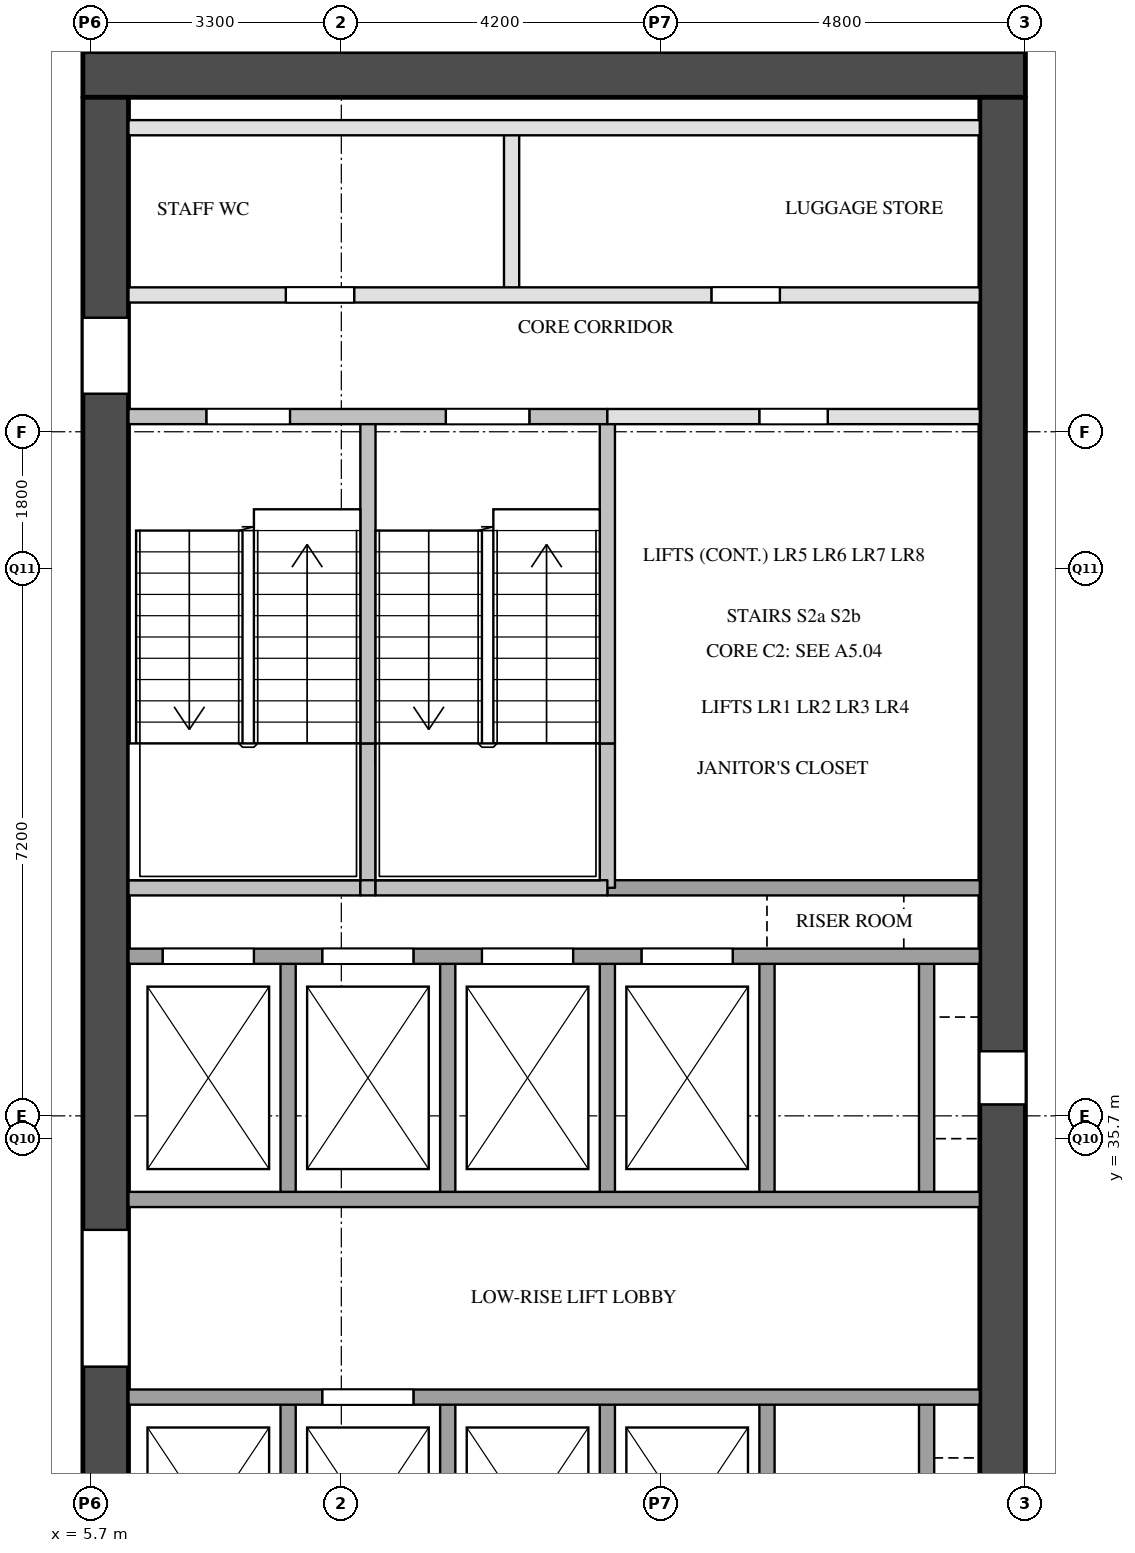
"""IFC4 building model, lengths in metres.
Left out: names, types, materials, properties, quantities, classifications, styles, units other than length and angle.
Written with IfcOpenShell. Run it as: python <this file> out.ifc"""

import sys

from ifc_helpers import new_model, si_unit, direction, frame, frame_2d, origin, place, context, subcontext, project, spatial, rectangle, extrude, element, fill, save


model = new_model("IFC4")
c1 = context("Model", 3, precision=1e-05, world=origin(), true_north=direction((0.0, 1.0)))
c2 = subcontext(c1, "Body", "Model", "MODEL_VIEW")
j1 = project(units=[si_unit("LENGTHUNIT", "METRE"), si_unit("PLANEANGLEUNIT", "RADIAN")], contexts=[c1])
p1 = place(None, origin())
s1 = spatial("IfcSite", under=j1, at=p1, CompositionType="ELEMENT")
p2 = place(p1, origin())
s2 = spatial("IfcBuilding", under=s1, at=p2, CompositionType="ELEMENT")
p3 = place(p2, frame((0.0, 0.0, 38.6)))
s3 = spatial("IfcBuildingStorey", under=s2, at=p3, CompositionType="ELEMENT", Elevation=38.6)
p4 = place(p3, frame((5.6, 49.7, 0.0), z_axis=(0.0, 0.0, 1.0), x_axis=(1.0, 0.0, 0.0)))
e1 = element("IfcWall", 1, at=p4, inside=s3, PredefinedType="SHEAR", context=c2, shape_type="SweptSolid", body=[
    extrude(rectangle(XDim=12.4, YDim=0.6, at=frame_2d((6.2, 0.0))), origin(), (0.0, 0.0, 1.0), 3.5),
])
p5 = place(p3, frame((5.9, 29.1, 0.0), z_axis=(0.0, 0.0, 1.0), x_axis=(0.0, 1.0, 0.0)))
e2 = element("IfcWall", 2, at=p5, inside=s3, PredefinedType="SHEAR", context=c2, shape_type="SweptSolid", body=[
    extrude(rectangle(XDim=20.3, YDim=0.6, at=frame_2d((10.15, 0.0))), origin(), (0.0, 0.0, 1.0), 3.5),
])
p6 = place(p5, frame((3.6, 0.0, 0.0)))
e3 = element("IfcOpeningElement", 3, at=p6, cuts=e2, PredefinedType="OPENING", context=c2, shape_type="SweptSolid", body=[
    extrude(rectangle(XDim=1.8, YDim=2.1, at=frame_2d((0.9, 1.05))), frame((0.0, 0.31, 0.0), z_axis=(0.0, -1.0, 0.0), x_axis=(1.0, 0.0, 0.0)), (0.0, 0.0, 1.0), 0.62),
])
p7 = place(p5, frame((16.4, 0.0, 0.0)))
e4 = element("IfcOpeningElement", 4, at=p7, cuts=e2, PredefinedType="OPENING", context=c2, shape_type="SweptSolid", body=[
    extrude(rectangle(XDim=1.0, YDim=2.1, at=frame_2d((0.5, 1.05))), frame((0.0, 0.31, 0.0), z_axis=(0.0, -1.0, 0.0), x_axis=(1.0, 0.0, 0.0)), (0.0, 0.0, 1.0), 0.62),
])
p8 = place(p3, frame((17.7, 29.1, 0.0), z_axis=(0.0, 0.0, 1.0), x_axis=(0.0, 1.0, 0.0)))
e5 = element("IfcWall", 5, at=p8, inside=s3, PredefinedType="SHEAR", context=c2, shape_type="SweptSolid", body=[
    extrude(rectangle(XDim=20.3, YDim=0.6, at=frame_2d((10.15, 0.0))), origin(), (0.0, 0.0, 1.0), 3.5),
])
p9 = place(p8, frame((1.25, 0.0, 0.0)))
e6 = element("IfcOpeningElement", 6, at=p9, cuts=e5, PredefinedType="OPENING", context=c2, shape_type="SweptSolid", body=[
    extrude(rectangle(XDim=0.7, YDim=2.1, at=frame_2d((0.35, 1.05))), frame((0.0, 0.31, 0.0), z_axis=(0.0, -1.0, 0.0), x_axis=(1.0, 0.0, 0.0)), (0.0, 0.0, 1.0), 0.62),
])
p10 = place(p8, frame((7.05, 0.0, 0.0)))
e7 = element("IfcOpeningElement", 7, at=p10, cuts=e5, PredefinedType="OPENING", context=c2, shape_type="SweptSolid", body=[
    extrude(rectangle(XDim=0.7, YDim=2.1, at=frame_2d((0.35, 1.05))), frame((0.0, 0.31, 0.0), z_axis=(0.0, -1.0, 0.0), x_axis=(1.0, 0.0, 0.0)), (0.0, 0.0, 1.0), 0.62),
])
p11 = place(p3, frame((8.3, 29.1, 0.0), z_axis=(0.0, 0.0, 1.0), x_axis=(0.0, 1.0, 0.0)))
e8 = element("IfcWall", 8, at=p11, inside=s3, PredefinedType="SOLIDWALL", context=c2, shape_type="SweptSolid", body=[
    extrude(rectangle(XDim=3.2, YDim=0.2, at=frame_2d((1.6, 0.0))), origin(), (0.0, 0.0, 1.0), 3.5),
])
p12 = place(p3, frame((8.3, 34.9, 0.0), z_axis=(0.0, 0.0, 1.0), x_axis=(0.0, 1.0, 0.0)))
e9 = element("IfcWall", 9, at=p12, inside=s3, PredefinedType="SOLIDWALL", context=c2, shape_type="SweptSolid", body=[
    extrude(rectangle(XDim=3.2, YDim=0.2, at=frame_2d((1.6, 0.0))), origin(), (0.0, 0.0, 1.0), 3.5),
])
p13 = place(p3, frame((9.35, 39.0, 0.0), z_axis=(0.0, 0.0, 1.0), x_axis=(0.0, 1.0, 0.0)))
e10 = element("IfcWall", 10, at=p13, inside=s3, PredefinedType="SOLIDWALL", context=c2, shape_type="SweptSolid", body=[
    extrude(rectangle(XDim=1.9, YDim=0.2, at=frame_2d((0.95, 0.0))), origin(), (0.0, 0.0, 1.0), 3.5),
])
p14 = place(p3, frame((9.35, 40.9, 0.0), z_axis=(0.0, 0.0, 1.0), x_axis=(0.0, 1.0, 0.0)))
e11 = element("IfcWall", 11, at=p14, inside=s3, PredefinedType="SOLIDWALL", context=c2, shape_type="SweptSolid", body=[
    extrude(rectangle(XDim=4.3, YDim=0.2, at=frame_2d((2.15, 0.0))), origin(), (0.0, 0.0, 1.0), 3.5),
])
p15 = place(p3, frame((10.4, 29.1, 0.0), z_axis=(0.0, 0.0, 1.0), x_axis=(0.0, 1.0, 0.0)))
e12 = element("IfcWall", 12, at=p15, inside=s3, PredefinedType="SOLIDWALL", context=c2, shape_type="SweptSolid", body=[
    extrude(rectangle(XDim=3.2, YDim=0.2, at=frame_2d((1.6, 0.0))), origin(), (0.0, 0.0, 1.0), 3.5),
])
p16 = place(p3, frame((10.4, 34.9, 0.0), z_axis=(0.0, 0.0, 1.0), x_axis=(0.0, 1.0, 0.0)))
e13 = element("IfcWall", 13, at=p16, inside=s3, PredefinedType="SOLIDWALL", context=c2, shape_type="SweptSolid", body=[
    extrude(rectangle(XDim=3.2, YDim=0.2, at=frame_2d((1.6, 0.0))), origin(), (0.0, 0.0, 1.0), 3.5),
])
p17 = place(p3, frame((11.24, 46.8, 0.0), z_axis=(0.0, 0.0, 1.0), x_axis=(0.0, 1.0, 0.0)))
e14 = element("IfcWall", 14, at=p17, inside=s3, PredefinedType="PARTITIONING", context=c2, shape_type="SweptSolid", body=[
    extrude(rectangle(XDim=2.2, YDim=0.2, at=frame_2d((1.1, 0.0))), origin(), (0.0, 0.0, 1.0), 3.5),
])
p18 = place(p3, frame((12.5, 29.1, 0.0), z_axis=(0.0, 0.0, 1.0), x_axis=(0.0, 1.0, 0.0)))
e15 = element("IfcWall", 15, at=p18, inside=s3, PredefinedType="SOLIDWALL", context=c2, shape_type="SweptSolid", body=[
    extrude(rectangle(XDim=3.2, YDim=0.2, at=frame_2d((1.6, 0.0))), origin(), (0.0, 0.0, 1.0), 3.5),
])
p19 = place(p3, frame((12.5, 34.9, 0.0), z_axis=(0.0, 0.0, 1.0), x_axis=(0.0, 1.0, 0.0)))
e16 = element("IfcWall", 16, at=p19, inside=s3, PredefinedType="SOLIDWALL", context=c2, shape_type="SweptSolid", body=[
    extrude(rectangle(XDim=3.2, YDim=0.2, at=frame_2d((1.6, 0.0))), origin(), (0.0, 0.0, 1.0), 3.5),
])
p20 = place(p3, frame((12.5, 39.0, 0.0), z_axis=(0.0, 0.0, 1.0), x_axis=(0.0, 1.0, 0.0)))
e17 = element("IfcWall", 17, at=p20, inside=s3, PredefinedType="SOLIDWALL", context=c2, shape_type="SweptSolid", body=[
    extrude(rectangle(XDim=1.9, YDim=0.2, at=frame_2d((0.95, 0.0))), origin(), (0.0, 0.0, 1.0), 3.5),
])
p21 = place(p3, frame((12.5, 40.9, 0.0), z_axis=(0.0, 0.0, 1.0), x_axis=(0.0, 1.0, 0.0)))
e18 = element("IfcWall", 18, at=p21, inside=s3, PredefinedType="SOLIDWALL", context=c2, shape_type="SweptSolid", body=[
    extrude(rectangle(XDim=4.3, YDim=0.2, at=frame_2d((2.15, 0.0))), origin(), (0.0, 0.0, 1.0), 3.5),
])
p22 = place(p3, frame((14.6, 29.1, 0.0), z_axis=(0.0, 0.0, 1.0), x_axis=(0.0, 1.0, 0.0)))
e19 = element("IfcWall", 19, at=p22, inside=s3, PredefinedType="SOLIDWALL", context=c2, shape_type="SweptSolid", body=[
    extrude(rectangle(XDim=3.2, YDim=0.2, at=frame_2d((1.6, 0.0))), origin(), (0.0, 0.0, 1.0), 3.5),
])
p23 = place(p3, frame((14.6, 34.9, 0.0), z_axis=(0.0, 0.0, 1.0), x_axis=(0.0, 1.0, 0.0)))
e20 = element("IfcWall", 20, at=p23, inside=s3, PredefinedType="SOLIDWALL", context=c2, shape_type="SweptSolid", body=[
    extrude(rectangle(XDim=3.2, YDim=0.2, at=frame_2d((1.6, 0.0))), origin(), (0.0, 0.0, 1.0), 3.5),
])
p24 = place(p3, frame((16.7, 29.1, 0.0), z_axis=(0.0, 0.0, 1.0), x_axis=(0.0, 1.0, 0.0)))
e21 = element("IfcWall", 21, at=p24, inside=s3, PredefinedType="SOLIDWALL", context=c2, shape_type="SweptSolid", body=[
    extrude(rectangle(XDim=3.2, YDim=0.2, at=frame_2d((1.6, 0.0))), origin(), (0.0, 0.0, 1.0), 3.5),
])
p25 = place(p3, frame((16.7, 34.9, 0.0), z_axis=(0.0, 0.0, 1.0), x_axis=(0.0, 1.0, 0.0)))
e22 = element("IfcWall", 22, at=p25, inside=s3, PredefinedType="SOLIDWALL", context=c2, shape_type="SweptSolid", body=[
    extrude(rectangle(XDim=3.2, YDim=0.2, at=frame_2d((1.6, 0.0))), origin(), (0.0, 0.0, 1.0), 3.5),
])
p26 = place(p3, frame((6.2, 32.3, 0.0), z_axis=(0.0, 0.0, 1.0), x_axis=(1.0, 0.0, 0.0)))
e23 = element("IfcWall", 23, at=p26, inside=s3, PredefinedType="SOLIDWALL", context=c2, shape_type="SweptSolid", body=[
    extrude(rectangle(XDim=11.2, YDim=0.2, at=frame_2d((5.6, 0.0))), origin(), (0.0, 0.0, 1.0), 3.5),
])
p27 = place(p26, frame((2.55, 0.0, 0.0)))
e24 = element("IfcOpeningElement", 24, at=p27, cuts=e23, PredefinedType="OPENING", context=c2, shape_type="SweptSolid", body=[
    extrude(rectangle(XDim=1.2, YDim=2.1, at=frame_2d((0.6, 1.05))), frame((0.0, 0.11, 0.0), z_axis=(0.0, -1.0, 0.0), x_axis=(1.0, 0.0, 0.0)), (0.0, 0.0, 1.0), 0.22),
])
p28 = place(p3, frame((6.2, 34.9, 0.0), z_axis=(0.0, 0.0, 1.0), x_axis=(1.0, 0.0, 0.0)))
e25 = element("IfcWall", 25, at=p28, inside=s3, PredefinedType="SOLIDWALL", context=c2, shape_type="SweptSolid", body=[
    extrude(rectangle(XDim=11.2, YDim=0.2, at=frame_2d((5.6, 0.0))), origin(), (0.0, 0.0, 1.0), 3.5),
])
p29 = place(p3, frame((6.2, 38.1, 0.0), z_axis=(0.0, 0.0, 1.0), x_axis=(1.0, 0.0, 0.0)))
e26 = element("IfcWall", 26, at=p29, inside=s3, PredefinedType="SOLIDWALL", context=c2, shape_type="SweptSolid", body=[
    extrude(rectangle(XDim=11.2, YDim=0.2, at=frame_2d((5.6, 0.0))), origin(), (0.0, 0.0, 1.0), 3.5),
])
p30 = place(p29, frame((0.45, 0.0, 0.0)))
e27 = element("IfcOpeningElement", 27, at=p30, cuts=e26, PredefinedType="OPENING", context=c2, shape_type="SweptSolid", body=[
    extrude(rectangle(XDim=1.2, YDim=2.1, at=frame_2d((0.6, 1.05))), frame((0.0, 0.11, 0.0), z_axis=(0.0, -1.0, 0.0), x_axis=(1.0, 0.0, 0.0)), (0.0, 0.0, 1.0), 0.22),
])
p31 = place(p29, frame((2.55, 0.0, 0.0)))
e28 = element("IfcOpeningElement", 28, at=p31, cuts=e26, PredefinedType="OPENING", context=c2, shape_type="SweptSolid", body=[
    extrude(rectangle(XDim=1.2, YDim=2.1, at=frame_2d((0.6, 1.05))), frame((0.0, 0.11, 0.0), z_axis=(0.0, -1.0, 0.0), x_axis=(1.0, 0.0, 0.0)), (0.0, 0.0, 1.0), 0.22),
])
p32 = place(p29, frame((4.65, 0.0, 0.0)))
e29 = element("IfcOpeningElement", 29, at=p32, cuts=e26, PredefinedType="OPENING", context=c2, shape_type="SweptSolid", body=[
    extrude(rectangle(XDim=1.2, YDim=2.1, at=frame_2d((0.6, 1.05))), frame((0.0, 0.11, 0.0), z_axis=(0.0, -1.0, 0.0), x_axis=(1.0, 0.0, 0.0)), (0.0, 0.0, 1.0), 0.22),
])
p33 = place(p29, frame((6.75, 0.0, 0.0)))
e30 = element("IfcOpeningElement", 30, at=p33, cuts=e26, PredefinedType="OPENING", context=c2, shape_type="SweptSolid", body=[
    extrude(rectangle(XDim=1.2, YDim=2.1, at=frame_2d((0.6, 1.05))), frame((0.0, 0.11, 0.0), z_axis=(0.0, -1.0, 0.0), x_axis=(1.0, 0.0, 0.0)), (0.0, 0.0, 1.0), 0.22),
])
p34 = place(p3, frame((12.5, 39.0, 0.0), z_axis=(0.0, 0.0, 1.0), x_axis=(1.0, 0.0, 0.0)))
e31 = element("IfcWall", 31, at=p34, inside=s3, PredefinedType="SOLIDWALL", context=c2, shape_type="SweptSolid", body=[
    extrude(rectangle(XDim=4.9, YDim=0.2, at=frame_2d((2.45, 0.0))), origin(), (0.0, 0.0, 1.0), 3.5),
])
p35 = place(p3, frame((6.2, 39.0, 0.0), z_axis=(0.0, 0.0, 1.0), x_axis=(1.0, 0.0, 0.0)))
e32 = element("IfcWall", 32, at=p35, inside=s3, PredefinedType="SOLIDWALL", context=c2, shape_type="SweptSolid", body=[
    extrude(rectangle(XDim=3.05, YDim=0.2, at=frame_2d((1.525, 0.0))), origin(), (0.0, 0.0, 1.0), 3.5),
])
p36 = place(p3, frame((9.25, 39.0, 0.0), z_axis=(0.0, 0.0, 1.0), x_axis=(1.0, 0.0, 0.0)))
e33 = element("IfcWall", 33, at=p36, inside=s3, PredefinedType="SOLIDWALL", context=c2, shape_type="SweptSolid", body=[
    extrude(rectangle(XDim=0.2, YDim=0.2, at=frame_2d((0.1, 0.0))), origin(), (0.0, 0.0, 1.0), 3.5),
])
p37 = place(p3, frame((9.45, 39.0, 0.0), z_axis=(0.0, 0.0, 1.0), x_axis=(1.0, 0.0, 0.0)))
e34 = element("IfcWall", 34, at=p37, inside=s3, PredefinedType="SOLIDWALL", context=c2, shape_type="SweptSolid", body=[
    extrude(rectangle(XDim=3.05, YDim=0.2, at=frame_2d((1.525, 0.0))), origin(), (0.0, 0.0, 1.0), 3.5),
])
p38 = place(p3, frame((12.5, 45.2, 0.0), z_axis=(0.0, 0.0, 1.0), x_axis=(1.0, 0.0, 0.0)))
e35 = element("IfcWall", 35, at=p38, inside=s3, PredefinedType="PARTITIONING", context=c2, shape_type="SweptSolid", body=[
    extrude(rectangle(XDim=4.9, YDim=0.2, at=frame_2d((2.45, 0.0))), origin(), (0.0, 0.0, 1.0), 3.5),
])
p39 = place(p38, frame((2.0, 0.0, 0.0)))
e36 = element("IfcOpeningElement", 36, at=p39, cuts=e35, PredefinedType="OPENING", context=c2, shape_type="SweptSolid", body=[
    extrude(rectangle(XDim=0.9, YDim=2.1, at=frame_2d((0.45, 1.05))), frame((0.0, 0.11, 0.0), z_axis=(0.0, -1.0, 0.0), x_axis=(1.0, 0.0, 0.0)), (0.0, 0.0, 1.0), 0.22),
])
p40 = place(p3, frame((6.2, 45.2, 0.0), z_axis=(0.0, 0.0, 1.0), x_axis=(1.0, 0.0, 0.0)))
e37 = element("IfcWall", 37, at=p40, inside=s3, PredefinedType="SOLIDWALL", context=c2, shape_type="SweptSolid", body=[
    extrude(rectangle(XDim=6.3, YDim=0.2, at=frame_2d((3.15, 0.0))), origin(), (0.0, 0.0, 1.0), 3.5),
])
p41 = place(p40, frame((1.025, 0.0, 0.0)))
e38 = element("IfcOpeningElement", 38, at=p41, cuts=e37, PredefinedType="OPENING", context=c2, shape_type="SweptSolid", body=[
    extrude(rectangle(XDim=1.1, YDim=2.1, at=frame_2d((0.55, 1.05))), frame((0.0, 0.11, 0.0), z_axis=(0.0, -1.0, 0.0), x_axis=(1.0, 0.0, 0.0)), (0.0, 0.0, 1.0), 0.22),
])
p42 = place(p40, frame((4.175, 0.0, 0.0)))
e39 = element("IfcOpeningElement", 39, at=p42, cuts=e37, PredefinedType="OPENING", context=c2, shape_type="SweptSolid", body=[
    extrude(rectangle(XDim=1.1, YDim=2.1, at=frame_2d((0.55, 1.05))), frame((0.0, 0.11, 0.0), z_axis=(0.0, -1.0, 0.0), x_axis=(1.0, 0.0, 0.0)), (0.0, 0.0, 1.0), 0.22),
])
p43 = place(p3, frame((6.2, 46.8, 0.0), z_axis=(0.0, 0.0, 1.0), x_axis=(1.0, 0.0, 0.0)))
e40 = element("IfcWall", 40, at=p43, inside=s3, PredefinedType="PARTITIONING", context=c2, shape_type="SweptSolid", body=[
    extrude(rectangle(XDim=11.2, YDim=0.2, at=frame_2d((5.6, 0.0))), origin(), (0.0, 0.0, 1.0), 3.5),
])
p44 = place(p43, frame((2.07, 0.0, 0.0)))
e41 = element("IfcOpeningElement", 41, at=p44, cuts=e40, PredefinedType="OPENING", context=c2, shape_type="SweptSolid", body=[
    extrude(rectangle(XDim=0.9, YDim=2.1, at=frame_2d((0.45, 1.05))), frame((0.0, 0.11, 0.0), z_axis=(0.0, -1.0, 0.0), x_axis=(1.0, 0.0, 0.0)), (0.0, 0.0, 1.0), 0.22),
])
p45 = place(p43, frame((7.67, 0.0, 0.0)))
e42 = element("IfcOpeningElement", 42, at=p45, cuts=e40, PredefinedType="OPENING", context=c2, shape_type="SweptSolid", body=[
    extrude(rectangle(XDim=0.9, YDim=2.1, at=frame_2d((0.45, 1.05))), frame((0.0, 0.11, 0.0), z_axis=(0.0, -1.0, 0.0), x_axis=(1.0, 0.0, 0.0)), (0.0, 0.0, 1.0), 0.22),
])
p46 = place(p3, frame((6.2, 49.0, 0.0), z_axis=(0.0, 0.0, 1.0), x_axis=(1.0, 0.0, 0.0)))
e43 = element("IfcWall", 43, at=p46, inside=s3, PredefinedType="PARTITIONING", context=c2, shape_type="SweptSolid", body=[
    extrude(rectangle(XDim=11.2, YDim=0.2, at=frame_2d((5.6, 0.0))), origin(), (0.0, 0.0, 1.0), 3.5),
])
p47 = place(p27, origin())
e44 = element("IfcDoor", 44, at=p47, inside=s3, OperationType="SLIDING_TO_LEFT", PredefinedType="DOOR", context=c2, shape_type="SweptSolid", body=[
    extrude(rectangle(XDim=1.2, YDim=2.1, at=frame_2d((0.6, 1.05))), frame((0.0, 0.025, 0.0), z_axis=(0.0, -1.0, 0.0), x_axis=(1.0, 0.0, 0.0)), (0.0, 0.0, 1.0), 0.05),
])
fill(e24, e44)
p48 = place(p30, origin())
e45 = element("IfcDoor", 45, at=p48, inside=s3, OperationType="SLIDING_TO_LEFT", PredefinedType="DOOR", context=c2, shape_type="SweptSolid", body=[
    extrude(rectangle(XDim=1.2, YDim=2.1, at=frame_2d((0.6, 1.05))), frame((0.0, 0.025, 0.0), z_axis=(0.0, -1.0, 0.0), x_axis=(1.0, 0.0, 0.0)), (0.0, 0.0, 1.0), 0.05),
])
fill(e27, e45)
p49 = place(p31, origin())
e46 = element("IfcDoor", 46, at=p49, inside=s3, OperationType="SLIDING_TO_LEFT", PredefinedType="DOOR", context=c2, shape_type="SweptSolid", body=[
    extrude(rectangle(XDim=1.2, YDim=2.1, at=frame_2d((0.6, 1.05))), frame((0.0, 0.025, 0.0), z_axis=(0.0, -1.0, 0.0), x_axis=(1.0, 0.0, 0.0)), (0.0, 0.0, 1.0), 0.05),
])
fill(e28, e46)
p50 = place(p32, origin())
e47 = element("IfcDoor", 47, at=p50, inside=s3, OperationType="SLIDING_TO_LEFT", PredefinedType="DOOR", context=c2, shape_type="SweptSolid", body=[
    extrude(rectangle(XDim=1.2, YDim=2.1, at=frame_2d((0.6, 1.05))), frame((0.0, 0.025, 0.0), z_axis=(0.0, -1.0, 0.0), x_axis=(1.0, 0.0, 0.0)), (0.0, 0.0, 1.0), 0.05),
])
fill(e29, e47)
p51 = place(p33, origin())
e48 = element("IfcDoor", 48, at=p51, inside=s3, OperationType="SLIDING_TO_LEFT", PredefinedType="DOOR", context=c2, shape_type="SweptSolid", body=[
    extrude(rectangle(XDim=1.2, YDim=2.1, at=frame_2d((0.6, 1.05))), frame((0.0, 0.025, 0.0), z_axis=(0.0, -1.0, 0.0), x_axis=(1.0, 0.0, 0.0)), (0.0, 0.0, 1.0), 0.05),
])
fill(e30, e48)
p52 = place(p10, origin())
e49 = element("IfcDoor", 49, at=p52, inside=s3, OperationType="SINGLE_SWING_LEFT", PredefinedType="DOOR", context=c2, shape_type="SweptSolid", body=[
    extrude(rectangle(XDim=0.7, YDim=2.1, at=frame_2d((0.35, 1.05))), frame((0.0, 0.025, 0.0), z_axis=(0.0, -1.0, 0.0), x_axis=(1.0, 0.0, 0.0)), (0.0, 0.0, 1.0), 0.05),
])
fill(e7, e49)
p53 = place(p6, origin())
e50 = element("IfcDoor", 50, at=p53, inside=s3, OperationType="DOUBLE_DOOR_SINGLE_SWING", PredefinedType="DOOR", context=c2, shape_type="SweptSolid", body=[
    extrude(rectangle(XDim=1.8, YDim=2.1, at=frame_2d((0.9, 1.05))), frame((0.0, 0.025, 0.0), z_axis=(0.0, -1.0, 0.0), x_axis=(1.0, 0.0, 0.0)), (0.0, 0.0, 1.0), 0.05),
])
fill(e3, e50)
p54 = place(p41, origin())
e51 = element("IfcDoor", 51, at=p54, inside=s3, OperationType="SINGLE_SWING_LEFT", PredefinedType="DOOR", context=c2, shape_type="SweptSolid", body=[
    extrude(rectangle(XDim=1.1, YDim=2.1, at=frame_2d((0.55, 1.05))), frame((0.0, 0.025, 0.0), z_axis=(0.0, -1.0, 0.0), x_axis=(1.0, 0.0, 0.0)), (0.0, 0.0, 1.0), 0.05),
])
fill(e38, e51)
p55 = place(p42, origin())
e52 = element("IfcDoor", 52, at=p55, inside=s3, OperationType="SINGLE_SWING_RIGHT", PredefinedType="DOOR", context=c2, shape_type="SweptSolid", body=[
    extrude(rectangle(XDim=1.1, YDim=2.1, at=frame_2d((0.55, 1.05))), frame((0.0, 0.025, 0.0), z_axis=(0.0, -1.0, 0.0), x_axis=(1.0, 0.0, 0.0)), (0.0, 0.0, 1.0), 0.05),
])
fill(e39, e52)
p56 = place(p7, origin())
e53 = element("IfcDoor", 53, at=p56, inside=s3, OperationType="SINGLE_SWING_RIGHT", PredefinedType="DOOR", context=c2, shape_type="SweptSolid", body=[
    extrude(rectangle(XDim=1.0, YDim=2.1, at=frame_2d((0.5, 1.05))), frame((0.0, 0.025, 0.0), z_axis=(0.0, -1.0, 0.0), x_axis=(1.0, 0.0, 0.0)), (0.0, 0.0, 1.0), 0.05),
])
fill(e4, e53)
p57 = place(p44, origin())
e54 = element("IfcDoor", 54, at=p57, inside=s3, OperationType="SINGLE_SWING_LEFT", PredefinedType="DOOR", context=c2, shape_type="SweptSolid", body=[
    extrude(rectangle(XDim=0.9, YDim=2.1, at=frame_2d((0.45, 1.05))), frame((0.0, 0.025, 0.0), z_axis=(0.0, -1.0, 0.0), x_axis=(1.0, 0.0, 0.0)), (0.0, 0.0, 1.0), 0.05),
])
fill(e41, e54)
p58 = place(p45, origin())
e55 = element("IfcDoor", 55, at=p58, inside=s3, OperationType="SINGLE_SWING_RIGHT", PredefinedType="DOOR", context=c2, shape_type="SweptSolid", body=[
    extrude(rectangle(XDim=0.9, YDim=2.1, at=frame_2d((0.45, 1.05))), frame((0.0, 0.025, 0.0), z_axis=(0.0, -1.0, 0.0), x_axis=(1.0, 0.0, 0.0)), (0.0, 0.0, 1.0), 0.05),
])
fill(e42, e55)
p59 = place(p39, origin())
e56 = element("IfcDoor", 56, at=p59, inside=s3, OperationType="SINGLE_SWING_RIGHT", PredefinedType="DOOR", context=c2, shape_type="SweptSolid", body=[
    extrude(rectangle(XDim=0.9, YDim=2.1, at=frame_2d((0.45, 1.05))), frame((0.0, 0.025, 0.0), z_axis=(0.0, -1.0, 0.0), x_axis=(1.0, 0.0, 0.0)), (0.0, 0.0, 1.0), 0.05),
])
fill(e36, e56)
save(model, sys.argv[1])
